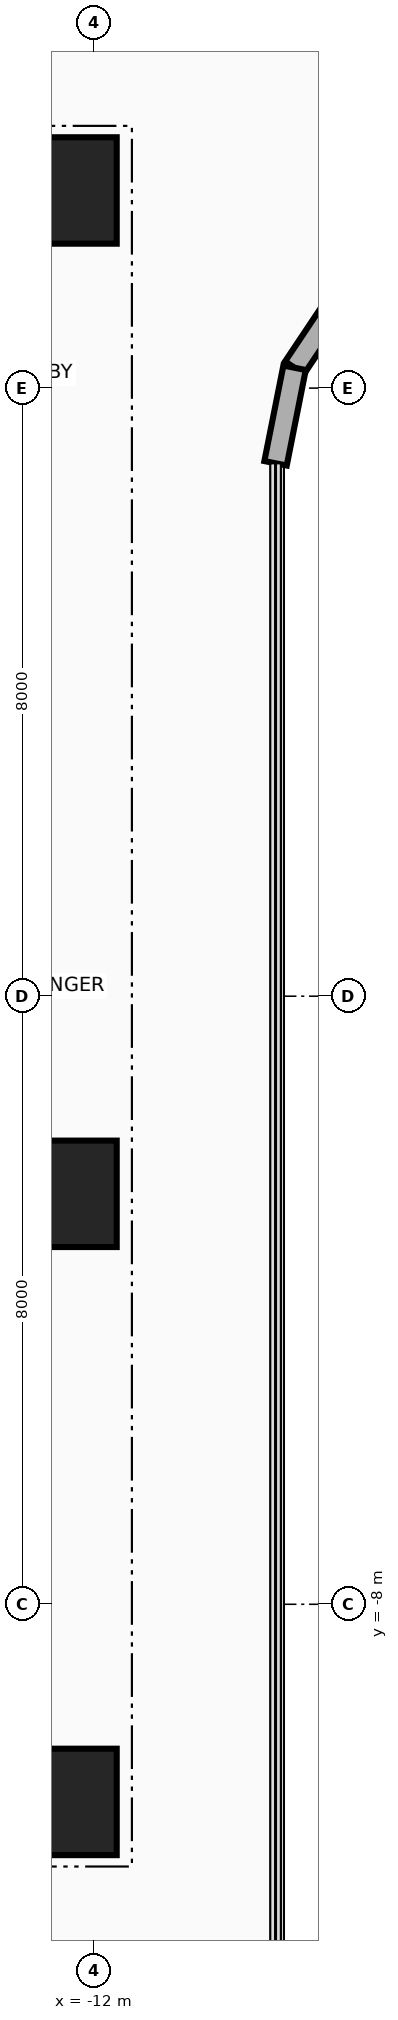
"""IFC4 building model, lengths in metres.
Left out: names, types, materials, properties, quantities, classifications, styles, units other than length and angle.
Written with IfcOpenShell. Run it as: python <this file> out.ifc"""

import sys

from ifc_helpers import new_model, si_unit, direction, frame, frame_2d, origin, origin_2d, place, context, subcontext, project, spatial, rectangle, extrude, source, transform, mapped, element, save


model = new_model("IFC4")
c1 = context("Model", 3, precision=1e-05, world=origin(), true_north=direction((0.0, 1.0)))
c2 = subcontext(c1, "Body", "Model", "MODEL_VIEW")
j1 = project(units=[si_unit("LENGTHUNIT", "METRE"), si_unit("PLANEANGLEUNIT", "RADIAN")], contexts=[c1])
p1 = place(None, origin())
s1 = spatial("IfcSite", under=j1, at=p1, CompositionType="ELEMENT")
p2 = place(p1, origin())
s2 = spatial("IfcBuilding", under=s1, at=p2, CompositionType="ELEMENT")
p3 = place(p2, frame((0.0, 0.0, 44.5)))
s3 = spatial("IfcBuildingStorey", under=s2, at=p3, CompositionType="ELEMENT", Elevation=44.5)
for number, where, z_axis, x_axis in (
    (1, (-22.65, 10.8, 0.0), (0.0, 0.0, 1.0), (1.0, 0.0, 0.0)),
    (2, (-22.65, -10.8, 0.0), (0.0, 0.0, 1.0), (1.0, 0.0, 0.0)),
):
    element("IfcWall", number, at=place(p3, frame(where, z_axis=z_axis, x_axis=x_axis)), inside=s3, PredefinedType="SHEAR", context=c2, shape_type="SweptSolid", body=[
        extrude(rectangle(XDim=10.25, YDim=0.7, at=frame_2d((5.125, 0.0))), origin(), (0.0, 0.0, 1.0), 3.46),
    ])
m1 = source(origin(), c2, "Body", "SweptSolid", [
    extrude(rectangle(XDim=1.4, YDim=1.4, at=origin_2d()), origin(), (0.0, 0.0, 1.0), 3.7),
])
for number, where, z_axis, x_axis in (
    (3, (-12.4, -10.6, 0.0), (0.0, 0.0, 1.0), (1.0, 0.0, 0.0)),
    (4, (-12.4, -2.6, 0.0), (0.0, 0.0, 1.0), (1.0, 0.0, 0.0)),
    (5, (-12.4, 10.6, 0.0), (0.0, 0.0, 1.0), (1.0, 0.0, 0.0)),
):
    element("IfcColumn", number, at=place(p3, frame(where, z_axis=z_axis, x_axis=x_axis)), inside=s3, PredefinedType="COLUMN", context=c2, shape_type="MappedRepresentation", body=[
        mapped(m1, transform((0.0, 0.0, 0.0), x_axis=(1.0, 0.0, 0.0), y_axis=(0.0, 1.0, 0.0), z_axis=(0.0, 0.0, 1.0), scale=1.0)),
    ])
p4 = place(p3, frame((-8.642, 9.342, 0.0), z_axis=(0.0, 0.0, 1.0), x_axis=(-0.555615398575, -0.831439431869, 0.0)))
e6 = element("IfcWall", 6, at=p4, inside=s3, PredefinedType="SOLIDWALL", context=c2, shape_type="SweptSolid", body=[
    extrude(rectangle(XDim=1.292, YDim=0.3, at=frame_2d((0.646, 0.0))), origin(), (0.0, 0.0, 1.0), 3.46),
])
p5 = place(p3, frame((-9.36, 8.268, 0.0), z_axis=(0.0, 0.0, 1.0), x_axis=(-0.195090163074, -0.980785312019, 0.0)))
e7 = element("IfcWall", 7, at=p5, inside=s3, PredefinedType="SOLIDWALL", context=c2, shape_type="SweptSolid", body=[
    extrude(rectangle(XDim=1.281, YDim=0.3, at=frame_2d((0.641, 0.0))), origin(), (0.0, 0.0, 1.0), 3.46),
])
save(model, sys.argv[1])
